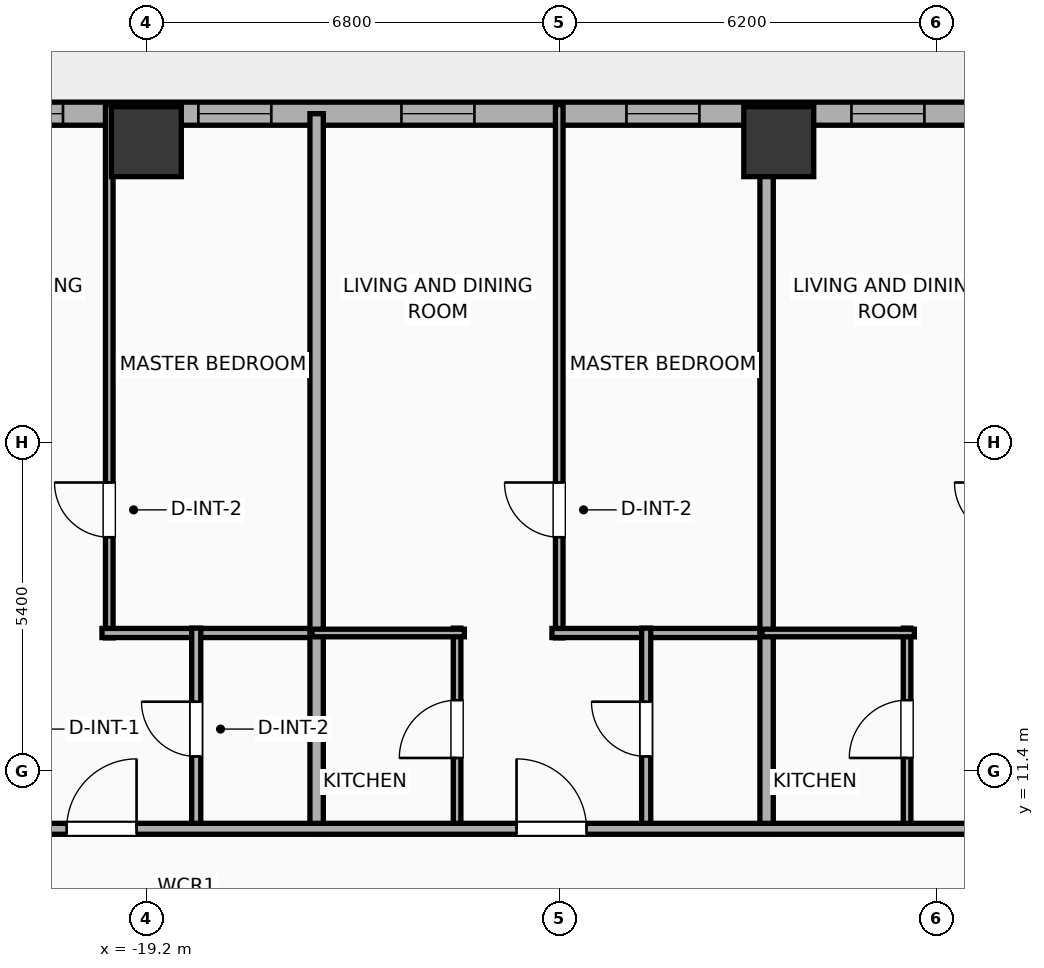
"""IFC4 building model, lengths in metres.
Left out: names, types, materials, properties, quantities, classifications, styles, units other than length and angle.
Written with IfcOpenShell. Run it as: python <this file> out.ifc"""

import sys

from ifc_helpers import new_model, si_unit, direction, frame, frame_2d, origin, origin_2d, place, context, subcontext, project, spatial, rectangle, hollow_rectangle, extrude, element, fill, save


model = new_model("IFC4")
c1 = context("Model", 3, precision=1e-05, world=origin(), true_north=direction((0.0, 1.0)))
c2 = subcontext(c1, "Body", "Model", "MODEL_VIEW")
j1 = project(units=[si_unit("LENGTHUNIT", "METRE"), si_unit("PLANEANGLEUNIT", "RADIAN")], contexts=[c1])
p1 = place(None, origin())
s1 = spatial("IfcSite", under=j1, at=p1, CompositionType="ELEMENT")
p2 = place(p1, origin())
s2 = spatial("IfcBuilding", under=s1, at=p2, CompositionType="ELEMENT")
p3 = place(p2, frame((0.0, 0.0, 26.0)))
s3 = spatial("IfcBuildingStorey", under=s2, at=p3, CompositionType="ELEMENT", Elevation=26.0)
for number, where, z_axis, x_axis in (
    (1, (-8.8, 21.75, -0.25), (0.0, 0.0, 1.0), (1.0, 0.0, 0.0)),
    (2, (-19.2, 21.75, -0.25), (0.0, 0.0, 1.0), (1.0, 0.0, 0.0)),
):
    element("IfcColumn", number, at=place(p3, frame(where, z_axis=z_axis, x_axis=x_axis)), inside=s3, PredefinedType="COLUMN", context=c2, shape_type="SweptSolid", body=[
        extrude(hollow_rectangle(XDim=1.15, YDim=1.15, WallThickness=0.04, at=origin_2d()), origin(), (0.0, 0.0, 1.0), 4.15),
    ])
p4 = place(p3, frame((-29.581, 22.21, 0.0), z_axis=(0.0, 0.0, 1.0), x_axis=(1.0, 0.0, 0.0)))
e3 = element("IfcWall", 3, at=p4, inside=s3, PredefinedType="ELEMENTEDWALL", context=c2, shape_type="SweptSolid", body=[
    extrude(rectangle(XDim=51.963, YDim=0.38, at=frame_2d((25.981, 0.0))), origin(), (0.0, 0.0, 1.0), 2.54),
])
p5 = place(p4, frame((6.61, 0.0, 0.75)))
e4 = element("IfcOpeningElement", 4, at=p5, cuts=e3, PredefinedType="OPENING", context=c2, shape_type="SweptSolid", body=[
    extrude(rectangle(XDim=2.4, YDim=1.63, at=frame_2d((1.2, 0.815))), frame((0.0, 0.2, 0.0), z_axis=(0.0, -1.0, 0.0), x_axis=(1.0, 0.0, 0.0)), (0.0, 0.0, 1.0), 0.4),
])
p6 = place(p4, frame((24.781, 0.0, 0.75)))
e5 = element("IfcOpeningElement", 5, at=p6, cuts=e3, PredefinedType="OPENING", context=c2, shape_type="SweptSolid", body=[
    extrude(rectangle(XDim=2.4, YDim=1.63, at=frame_2d((1.2, 0.815))), frame((0.0, 0.2, 0.0), z_axis=(0.0, -1.0, 0.0), x_axis=(1.0, 0.0, 0.0)), (0.0, 0.0, 1.0), 0.4),
])
p7 = place(p4, frame((42.952, 0.0, 0.75)))
e6 = element("IfcOpeningElement", 6, at=p7, cuts=e3, PredefinedType="OPENING", context=c2, shape_type="SweptSolid", body=[
    extrude(rectangle(XDim=2.4, YDim=1.63, at=frame_2d((1.2, 0.815))), frame((0.0, 0.2, 0.0), z_axis=(0.0, -1.0, 0.0), x_axis=(1.0, 0.0, 0.0)), (0.0, 0.0, 1.0), 0.4),
])
p8 = place(p4, frame((3.476, 0.0, 0.75)))
e7 = element("IfcOpeningElement", 7, at=p8, cuts=e3, PredefinedType="OPENING", context=c2, shape_type="SweptSolid", body=[
    extrude(rectangle(XDim=1.2, YDim=1.63, at=frame_2d((0.6, 0.815))), frame((0.0, 0.2, 0.0), z_axis=(0.0, -1.0, 0.0), x_axis=(1.0, 0.0, 0.0)), (0.0, 0.0, 1.0), 0.4),
])
p9 = place(p4, frame((11.236, 0.0, 0.75)))
e8 = element("IfcOpeningElement", 8, at=p9, cuts=e3, PredefinedType="OPENING", context=c2, shape_type="SweptSolid", body=[
    extrude(rectangle(XDim=1.2, YDim=1.63, at=frame_2d((0.6, 0.815))), frame((0.0, 0.2, 0.0), z_axis=(0.0, -1.0, 0.0), x_axis=(1.0, 0.0, 0.0)), (0.0, 0.0, 1.0), 0.4),
])
p10 = place(p4, frame((14.576, 0.0, 0.75)))
e9 = element("IfcOpeningElement", 9, at=p10, cuts=e3, PredefinedType="OPENING", context=c2, shape_type="SweptSolid", body=[
    extrude(rectangle(XDim=1.2, YDim=1.63, at=frame_2d((0.6, 0.815))), frame((0.0, 0.2, 0.0), z_axis=(0.0, -1.0, 0.0), x_axis=(1.0, 0.0, 0.0)), (0.0, 0.0, 1.0), 0.4),
])
p11 = place(p4, frame((18.276, 0.0, 0.75)))
e10 = element("IfcOpeningElement", 10, at=p11, cuts=e3, PredefinedType="OPENING", context=c2, shape_type="SweptSolid", body=[
    extrude(rectangle(XDim=1.2, YDim=1.63, at=frame_2d((0.6, 0.815))), frame((0.0, 0.2, 0.0), z_axis=(0.0, -1.0, 0.0), x_axis=(1.0, 0.0, 0.0)), (0.0, 0.0, 1.0), 0.4),
])
p12 = place(p4, frame((21.976, 0.0, 0.75)))
e11 = element("IfcOpeningElement", 11, at=p12, cuts=e3, PredefinedType="OPENING", context=c2, shape_type="SweptSolid", body=[
    extrude(rectangle(XDim=1.2, YDim=1.63, at=frame_2d((0.6, 0.815))), frame((0.0, 0.2, 0.0), z_axis=(0.0, -1.0, 0.0), x_axis=(1.0, 0.0, 0.0)), (0.0, 0.0, 1.0), 0.4),
])
p13 = place(p4, frame((29.136, 0.0, 0.75)))
e12 = element("IfcOpeningElement", 12, at=p13, cuts=e3, PredefinedType="OPENING", context=c2, shape_type="SweptSolid", body=[
    extrude(rectangle(XDim=1.2, YDim=1.63, at=frame_2d((0.6, 0.815))), frame((0.0, 0.2, 0.0), z_axis=(0.0, -1.0, 0.0), x_axis=(1.0, 0.0, 0.0)), (0.0, 0.0, 1.0), 0.4),
])
p14 = place(p4, frame((33.076, 0.0, 0.75)))
e13 = element("IfcOpeningElement", 13, at=p14, cuts=e3, PredefinedType="OPENING", context=c2, shape_type="SweptSolid", body=[
    extrude(rectangle(XDim=1.2, YDim=1.63, at=frame_2d((0.6, 0.815))), frame((0.0, 0.2, 0.0), z_axis=(0.0, -1.0, 0.0), x_axis=(1.0, 0.0, 0.0)), (0.0, 0.0, 1.0), 0.4),
])
p15 = place(p4, frame((36.776, 0.0, 0.75)))
e14 = element("IfcOpeningElement", 14, at=p15, cuts=e3, PredefinedType="OPENING", context=c2, shape_type="SweptSolid", body=[
    extrude(rectangle(XDim=1.2, YDim=1.63, at=frame_2d((0.6, 0.815))), frame((0.0, 0.2, 0.0), z_axis=(0.0, -1.0, 0.0), x_axis=(1.0, 0.0, 0.0)), (0.0, 0.0, 1.0), 0.4),
])
p16 = place(p4, frame((39.931, 0.0, 0.75)))
e15 = element("IfcOpeningElement", 15, at=p16, cuts=e3, PredefinedType="OPENING", context=c2, shape_type="SweptSolid", body=[
    extrude(rectangle(XDim=0.85, YDim=1.63, at=frame_2d((0.425, 0.815))), frame((0.0, 0.2, 0.0), z_axis=(0.0, -1.0, 0.0), x_axis=(1.0, 0.0, 0.0)), (0.0, 0.0, 1.0), 0.4),
])
p17 = place(p4, frame((47.469, 0.0, 0.75)))
e16 = element("IfcOpeningElement", 16, at=p17, cuts=e3, PredefinedType="OPENING", context=c2, shape_type="SweptSolid", body=[
    extrude(rectangle(XDim=1.2, YDim=1.63, at=frame_2d((0.6, 0.815))), frame((0.0, 0.2, 0.0), z_axis=(0.0, -1.0, 0.0), x_axis=(1.0, 0.0, 0.0)), (0.0, 0.0, 1.0), 0.4),
])
p18 = place(p4, frame((49.581, 0.0, 0.75)))
e17 = element("IfcOpeningElement", 17, at=p18, cuts=e3, PredefinedType="OPENING", context=c2, shape_type="SweptSolid", body=[
    extrude(rectangle(XDim=1.2, YDim=1.63, at=frame_2d((0.6, 0.815))), frame((0.0, 0.2, 0.0), z_axis=(0.0, -1.0, 0.0), x_axis=(1.0, 0.0, 0.0)), (0.0, 0.0, 1.0), 0.4),
])
p19 = place(p3, frame((-19.81, 13.59, 0.0), z_axis=(0.0, 0.0, 1.0), x_axis=(0.0, 1.0, 0.0)))
e18 = element("IfcWall", 18, at=p19, inside=s3, PredefinedType="PARTITIONING", context=c2, shape_type="SweptSolid", body=[
    extrude(rectangle(XDim=8.77, YDim=0.125, at=frame_2d((4.385, 0.0))), origin(), (0.0, 0.0, 1.0), 2.54),
])
p20 = place(p19, frame((1.655, 0.0, 0.0)))
e19 = element("IfcOpeningElement", 19, at=p20, cuts=e18, PredefinedType="OPENING", context=c2, shape_type="SweptSolid", body=[
    extrude(rectangle(XDim=0.9, YDim=2.05, at=frame_2d((0.45, 1.025))), frame((0.0, 0.073, 0.0), z_axis=(0.0, -1.0, 0.0), x_axis=(1.0, 0.0, 0.0)), (0.0, 0.0, 1.0), 0.145),
])
p21 = place(p3, frame((-19.93, 13.67, 0.0), z_axis=(0.0, 0.0, 1.0), x_axis=(1.0, 0.0, 0.0)))
e20 = element("IfcWall", 20, at=p21, inside=s3, PredefinedType="PLUMBINGWALL", context=c2, shape_type="SweptSolid", body=[
    extrude(rectangle(XDim=3.605, YDim=0.15, at=frame_2d((1.802, 0.0))), origin(), (0.0, 0.0, 1.0), 3.65),
])
p22 = place(p3, frame((-18.38, 10.43, 0.0), z_axis=(0.0, 0.0, 1.0), x_axis=(0.0, 1.0, 0.0)))
e21 = element("IfcWall", 21, at=p22, inside=s3, PredefinedType="PLUMBINGWALL", context=c2, shape_type="SweptSolid", body=[
    extrude(rectangle(XDim=3.32, YDim=0.15, at=frame_2d((1.66, 0.0))), origin(), (0.0, 0.0, 1.0), 3.65),
])
p23 = place(p22, frame((1.21, 0.0, 0.0)))
e22 = element("IfcOpeningElement", 22, at=p23, cuts=e21, PredefinedType="OPENING", context=c2, shape_type="SweptSolid", body=[
    extrude(rectangle(XDim=0.9, YDim=2.05, at=frame_2d((0.45, 1.025))), frame((0.0, 0.085, 0.0), z_axis=(0.0, -1.0, 0.0), x_axis=(1.0, 0.0, 0.0)), (0.0, 0.0, 1.0), 0.17),
])
p24 = place(p3, frame((-16.4, 10.37, 0.0), z_axis=(0.0, 0.0, 1.0), x_axis=(0.0, 1.0, 0.0)))
e23 = element("IfcWall", 23, at=p24, inside=s3, PredefinedType="PARTITIONING", context=c2, shape_type="SweptSolid", body=[
    extrude(rectangle(XDim=11.84, YDim=0.22, at=frame_2d((5.92, 0.0))), origin(), (0.0, 0.0, 1.0), 3.65),
])
p25 = place(p3, frame((-12.41, 13.59, 0.0), z_axis=(0.0, 0.0, 1.0), x_axis=(0.0, 1.0, 0.0)))
e24 = element("IfcWall", 24, at=p25, inside=s3, PredefinedType="PARTITIONING", context=c2, shape_type="SweptSolid", body=[
    extrude(rectangle(XDim=8.77, YDim=0.125, at=frame_2d((4.385, 0.0))), origin(), (0.0, 0.0, 1.0), 3.65),
])
p26 = place(p25, frame((1.655, 0.0, 0.0)))
e25 = element("IfcOpeningElement", 25, at=p26, cuts=e24, PredefinedType="OPENING", context=c2, shape_type="SweptSolid", body=[
    extrude(rectangle(XDim=0.9, YDim=2.05, at=frame_2d((0.45, 1.025))), frame((0.0, 0.073, 0.0), z_axis=(0.0, -1.0, 0.0), x_axis=(1.0, 0.0, 0.0)), (0.0, 0.0, 1.0), 0.145),
])
p27 = place(p3, frame((-12.53, 13.67, 0.0), z_axis=(0.0, 0.0, 1.0), x_axis=(1.0, 0.0, 0.0)))
e26 = element("IfcWall", 26, at=p27, inside=s3, PredefinedType="PLUMBINGWALL", context=c2, shape_type="SweptSolid", body=[
    extrude(rectangle(XDim=3.605, YDim=0.15, at=frame_2d((1.802, 0.0))), origin(), (0.0, 0.0, 1.0), 3.65),
])
p28 = place(p3, frame((-14.09, 10.43, 0.0), z_axis=(0.0, 0.0, 1.0), x_axis=(0.0, 1.0, 0.0)))
e27 = element("IfcWall", 27, at=p28, inside=s3, PredefinedType="PARTITIONING", context=c2, shape_type="SweptSolid", body=[
    extrude(rectangle(XDim=3.32, YDim=0.125, at=frame_2d((1.66, 0.0))), origin(), (0.0, 0.0, 1.0), 3.65),
])
p29 = place(p28, frame((1.185, 0.0, 0.0)))
e28 = element("IfcOpeningElement", 28, at=p29, cuts=e27, PredefinedType="OPENING", context=c2, shape_type="SweptSolid", body=[
    extrude(rectangle(XDim=0.95, YDim=2.05, at=frame_2d((0.475, 1.025))), frame((0.0, 0.073, 0.0), z_axis=(0.0, -1.0, 0.0), x_axis=(1.0, 0.0, 0.0)), (0.0, 0.0, 1.0), 0.145),
])
p30 = place(p3, frame((-16.475, 13.67, 0.0), z_axis=(0.0, 0.0, 1.0), x_axis=(1.0, 0.0, 0.0)))
e29 = element("IfcWall", 29, at=p30, inside=s3, PredefinedType="PARTITIONING", context=c2, shape_type="SweptSolid", body=[
    extrude(rectangle(XDim=2.505, YDim=0.125, at=frame_2d((1.252, 0.0))), origin(), (0.0, 0.0, 1.0), 3.65),
])
p31 = place(p3, frame((-10.98, 10.43, 0.0), z_axis=(0.0, 0.0, 1.0), x_axis=(0.0, 1.0, 0.0)))
e30 = element("IfcWall", 30, at=p31, inside=s3, PredefinedType="PLUMBINGWALL", context=c2, shape_type="SweptSolid", body=[
    extrude(rectangle(XDim=3.32, YDim=0.15, at=frame_2d((1.66, 0.0))), origin(), (0.0, 0.0, 1.0), 2.54),
])
p32 = place(p31, frame((1.21, 0.0, 0.0)))
e31 = element("IfcOpeningElement", 31, at=p32, cuts=e30, PredefinedType="OPENING", context=c2, shape_type="SweptSolid", body=[
    extrude(rectangle(XDim=0.9, YDim=2.05, at=frame_2d((0.45, 1.025))), frame((0.0, 0.085, 0.0), z_axis=(0.0, -1.0, 0.0), x_axis=(1.0, 0.0, 0.0)), (0.0, 0.0, 1.0), 0.17),
])
p33 = place(p3, frame((-9.0, 10.37, 0.0), z_axis=(0.0, 0.0, 1.0), x_axis=(0.0, 1.0, 0.0)))
e32 = element("IfcWall", 32, at=p33, inside=s3, PredefinedType="PARTITIONING", context=c2, shape_type="SweptSolid", body=[
    extrude(rectangle(XDim=11.84, YDim=0.22, at=frame_2d((5.92, 0.0))), origin(), (0.0, 0.0, 1.0), 2.54),
])
p34 = place(p3, frame((-6.69, 10.43, 0.0), z_axis=(0.0, 0.0, 1.0), x_axis=(0.0, 1.0, 0.0)))
e33 = element("IfcWall", 33, at=p34, inside=s3, PredefinedType="PARTITIONING", context=c2, shape_type="SweptSolid", body=[
    extrude(rectangle(XDim=3.32, YDim=0.125, at=frame_2d((1.66, 0.0))), origin(), (0.0, 0.0, 1.0), 3.65),
])
p35 = place(p34, frame((1.185, 0.0, 0.0)))
e34 = element("IfcOpeningElement", 34, at=p35, cuts=e33, PredefinedType="OPENING", context=c2, shape_type="SweptSolid", body=[
    extrude(rectangle(XDim=0.95, YDim=2.05, at=frame_2d((0.475, 1.025))), frame((0.0, 0.073, 0.0), z_axis=(0.0, -1.0, 0.0), x_axis=(1.0, 0.0, 0.0)), (0.0, 0.0, 1.0), 0.145),
])
p36 = place(p3, frame((-9.075, 13.67, 0.0), z_axis=(0.0, 0.0, 1.0), x_axis=(1.0, 0.0, 0.0)))
e35 = element("IfcWall", 35, at=p36, inside=s3, PredefinedType="PARTITIONING", context=c2, shape_type="SweptSolid", body=[
    extrude(rectangle(XDim=2.505, YDim=0.125, at=frame_2d((1.252, 0.0))), origin(), (0.0, 0.0, 1.0), 3.65),
])
p37 = place(p3, frame((-33.41, 10.45, 0.0), z_axis=(0.0, 0.0, 1.0), x_axis=(1.0, 0.0, 0.0)))
e36 = element("IfcWall", 36, at=p37, inside=s3, PredefinedType="PARTITIONING", context=c2, shape_type="SweptSolid", body=[
    extrude(rectangle(XDim=59.62, YDim=0.18, at=frame_2d((29.81, 0.0))), origin(), (0.0, 0.0, 1.0), 3.65),
])
p38 = place(p37, frame((4.529, 0.0, 0.0)))
e37 = element("IfcOpeningElement", 37, at=p38, cuts=e36, PredefinedType="OPENING", context=c2, shape_type="SweptSolid", body=[
    extrude(rectangle(XDim=1.15, YDim=2.05, at=frame_2d((0.575, 1.025))), frame((0.0, 0.1, 0.0), z_axis=(0.0, -1.0, 0.0), x_axis=(1.0, 0.0, 0.0)), (0.0, 0.0, 1.0), 0.2),
])
p39 = place(p37, frame((12.899, 0.0, 0.0)))
e38 = element("IfcOpeningElement", 38, at=p39, cuts=e36, PredefinedType="OPENING", context=c2, shape_type="SweptSolid", body=[
    extrude(rectangle(XDim=1.15, YDim=2.05, at=frame_2d((0.575, 1.025))), frame((0.0, 0.1, 0.0), z_axis=(0.0, -1.0, 0.0), x_axis=(1.0, 0.0, 0.0)), (0.0, 0.0, 1.0), 0.2),
])
p40 = place(p37, frame((20.298, 0.0, 0.0)))
e39 = element("IfcOpeningElement", 39, at=p40, cuts=e36, PredefinedType="OPENING", context=c2, shape_type="SweptSolid", body=[
    extrude(rectangle(XDim=1.15, YDim=2.05, at=frame_2d((0.575, 1.025))), frame((0.0, 0.1, 0.0), z_axis=(0.0, -1.0, 0.0), x_axis=(1.0, 0.0, 0.0)), (0.0, 0.0, 1.0), 0.2),
])
p41 = place(p37, frame((27.703, 0.0, 0.0)))
e40 = element("IfcOpeningElement", 40, at=p41, cuts=e36, PredefinedType="OPENING", context=c2, shape_type="SweptSolid", body=[
    extrude(rectangle(XDim=1.15, YDim=2.05, at=frame_2d((0.575, 1.025))), frame((0.0, 0.1, 0.0), z_axis=(0.0, -1.0, 0.0), x_axis=(1.0, 0.0, 0.0)), (0.0, 0.0, 1.0), 0.2),
])
p42 = place(p37, frame((35.102, 0.0, 0.0)))
e41 = element("IfcOpeningElement", 41, at=p42, cuts=e36, PredefinedType="OPENING", context=c2, shape_type="SweptSolid", body=[
    extrude(rectangle(XDim=1.15, YDim=2.05, at=frame_2d((0.575, 1.025))), frame((0.0, 0.1, 0.0), z_axis=(0.0, -1.0, 0.0), x_axis=(1.0, 0.0, 0.0)), (0.0, 0.0, 1.0), 0.2),
])
p43 = place(p37, frame((42.5, 0.0, 0.0)))
e42 = element("IfcOpeningElement", 42, at=p43, cuts=e36, PredefinedType="OPENING", context=c2, shape_type="SweptSolid", body=[
    extrude(rectangle(XDim=1.15, YDim=2.05, at=frame_2d((0.575, 1.025))), frame((0.0, 0.1, 0.0), z_axis=(0.0, -1.0, 0.0), x_axis=(1.0, 0.0, 0.0)), (0.0, 0.0, 1.0), 0.2),
])
p44 = place(p37, frame((48.099, 0.0, 0.0)))
e43 = element("IfcOpeningElement", 43, at=p44, cuts=e36, PredefinedType="OPENING", context=c2, shape_type="SweptSolid", body=[
    extrude(rectangle(XDim=1.15, YDim=2.05, at=frame_2d((0.575, 1.025))), frame((0.0, 0.1, 0.0), z_axis=(0.0, -1.0, 0.0), x_axis=(1.0, 0.0, 0.0)), (0.0, 0.0, 1.0), 0.2),
])
p45 = place(p37, frame((56.117, 0.0, 0.0)))
e44 = element("IfcOpeningElement", 44, at=p45, cuts=e36, PredefinedType="OPENING", context=c2, shape_type="SweptSolid", body=[
    extrude(rectangle(XDim=0.9, YDim=2.05, at=frame_2d((0.45, 1.025))), frame((0.0, 0.1, 0.0), z_axis=(0.0, -1.0, 0.0), x_axis=(1.0, 0.0, 0.0)), (0.0, 0.0, 1.0), 0.2),
])
p46 = place(p5, origin())
e45 = element("IfcWindow", 45, at=p46, inside=s3, PartitioningType="SINGLE_PANEL", PredefinedType="WINDOW", context=c2, shape_type="SweptSolid", body=[
    extrude(rectangle(XDim=2.4, YDim=1.63, at=frame_2d((1.2, 0.815))), frame((0.0, 0.03, 0.0), z_axis=(0.0, -1.0, 0.0), x_axis=(1.0, 0.0, 0.0)), (0.0, 0.0, 1.0), 0.06),
])
fill(e4, e45)
p47 = place(p9, origin())
e46 = element("IfcWindow", 46, at=p47, inside=s3, PartitioningType="SINGLE_PANEL", PredefinedType="WINDOW", context=c2, shape_type="SweptSolid", body=[
    extrude(rectangle(XDim=1.2, YDim=1.63, at=frame_2d((0.6, 0.815))), frame((0.0, 0.03, 0.0), z_axis=(0.0, -1.0, 0.0), x_axis=(1.0, 0.0, 0.0)), (0.0, 0.0, 1.0), 0.06),
])
fill(e8, e46)
p48 = place(p10, origin())
e47 = element("IfcWindow", 47, at=p48, inside=s3, PartitioningType="SINGLE_PANEL", PredefinedType="WINDOW", context=c2, shape_type="SweptSolid", body=[
    extrude(rectangle(XDim=1.2, YDim=1.63, at=frame_2d((0.6, 0.815))), frame((0.0, 0.03, 0.0), z_axis=(0.0, -1.0, 0.0), x_axis=(1.0, 0.0, 0.0)), (0.0, 0.0, 1.0), 0.06),
])
fill(e9, e47)
p49 = place(p11, origin())
e48 = element("IfcWindow", 48, at=p49, inside=s3, PartitioningType="SINGLE_PANEL", PredefinedType="WINDOW", context=c2, shape_type="SweptSolid", body=[
    extrude(rectangle(XDim=1.2, YDim=1.63, at=frame_2d((0.6, 0.815))), frame((0.0, 0.03, 0.0), z_axis=(0.0, -1.0, 0.0), x_axis=(1.0, 0.0, 0.0)), (0.0, 0.0, 1.0), 0.06),
])
fill(e10, e48)
p50 = place(p12, origin())
e49 = element("IfcWindow", 49, at=p50, inside=s3, PartitioningType="SINGLE_PANEL", PredefinedType="WINDOW", context=c2, shape_type="SweptSolid", body=[
    extrude(rectangle(XDim=1.2, YDim=1.63, at=frame_2d((0.6, 0.815))), frame((0.0, 0.03, 0.0), z_axis=(0.0, -1.0, 0.0), x_axis=(1.0, 0.0, 0.0)), (0.0, 0.0, 1.0), 0.06),
])
fill(e11, e49)
p51 = place(p20, origin())
e50 = element("IfcDoor", 50, at=p51, inside=s3, OperationType="SINGLE_SWING_RIGHT", PredefinedType="DOOR", context=c2, shape_type="SweptSolid", body=[
    extrude(rectangle(XDim=0.9, YDim=2.05, at=frame_2d((0.45, 1.025))), frame((0.0, 0.025, 0.0), z_axis=(0.0, -1.0, 0.0), x_axis=(1.0, 0.0, 0.0)), (0.0, 0.0, 1.0), 0.05),
])
fill(e19, e50)
p52 = place(p23, origin())
e51 = element("IfcDoor", 51, at=p52, inside=s3, OperationType="SINGLE_SWING_RIGHT", PredefinedType="DOOR", context=c2, shape_type="SweptSolid", body=[
    extrude(rectangle(XDim=0.9, YDim=2.05, at=frame_2d((0.45, 1.025))), frame((0.0, 0.025, 0.0), z_axis=(0.0, -1.0, 0.0), x_axis=(1.0, 0.0, 0.0)), (0.0, 0.0, 1.0), 0.05),
])
fill(e22, e51)
p53 = place(p26, origin())
e52 = element("IfcDoor", 52, at=p53, inside=s3, OperationType="SINGLE_SWING_RIGHT", PredefinedType="DOOR", context=c2, shape_type="SweptSolid", body=[
    extrude(rectangle(XDim=0.9, YDim=2.05, at=frame_2d((0.45, 1.025))), frame((0.0, 0.025, 0.0), z_axis=(0.0, -1.0, 0.0), x_axis=(1.0, 0.0, 0.0)), (0.0, 0.0, 1.0), 0.05),
])
fill(e25, e52)
p54 = place(p29, origin())
e53 = element("IfcDoor", 53, at=p54, inside=s3, OperationType="SINGLE_SWING_LEFT", PredefinedType="DOOR", context=c2, shape_type="SweptSolid", body=[
    extrude(rectangle(XDim=0.95, YDim=2.05, at=frame_2d((0.475, 1.025))), frame((0.0, 0.025, 0.0), z_axis=(0.0, -1.0, 0.0), x_axis=(1.0, 0.0, 0.0)), (0.0, 0.0, 1.0), 0.05),
])
fill(e28, e53)
p55 = place(p32, origin())
e54 = element("IfcDoor", 54, at=p55, inside=s3, OperationType="SINGLE_SWING_RIGHT", PredefinedType="DOOR", context=c2, shape_type="SweptSolid", body=[
    extrude(rectangle(XDim=0.9, YDim=2.05, at=frame_2d((0.45, 1.025))), frame((0.0, 0.025, 0.0), z_axis=(0.0, -1.0, 0.0), x_axis=(1.0, 0.0, 0.0)), (0.0, 0.0, 1.0), 0.05),
])
fill(e31, e54)
p56 = place(p35, origin())
e55 = element("IfcDoor", 55, at=p56, inside=s3, OperationType="SINGLE_SWING_LEFT", PredefinedType="DOOR", context=c2, shape_type="SweptSolid", body=[
    extrude(rectangle(XDim=0.95, YDim=2.05, at=frame_2d((0.475, 1.025))), frame((0.0, 0.025, 0.0), z_axis=(0.0, -1.0, 0.0), x_axis=(1.0, 0.0, 0.0)), (0.0, 0.0, 1.0), 0.05),
])
fill(e34, e55)
p57 = place(p39, origin())
e56 = element("IfcDoor", 56, at=p57, inside=s3, OperationType="SINGLE_SWING_RIGHT", PredefinedType="DOOR", context=c2, shape_type="SweptSolid", body=[
    extrude(rectangle(XDim=1.15, YDim=2.05, at=frame_2d((0.575, 1.025))), frame((0.0, 0.025, 0.0), z_axis=(0.0, -1.0, 0.0), x_axis=(1.0, 0.0, 0.0)), (0.0, 0.0, 1.0), 0.05),
])
fill(e38, e56)
p58 = place(p40, origin())
e57 = element("IfcDoor", 57, at=p58, inside=s3, OperationType="SINGLE_SWING_LEFT", PredefinedType="DOOR", context=c2, shape_type="SweptSolid", body=[
    extrude(rectangle(XDim=1.15, YDim=2.05, at=frame_2d((0.575, 1.025))), frame((0.0, 0.025, 0.0), z_axis=(0.0, -1.0, 0.0), x_axis=(1.0, 0.0, 0.0)), (0.0, 0.0, 1.0), 0.05),
])
fill(e39, e57)
save(model, sys.argv[1])
